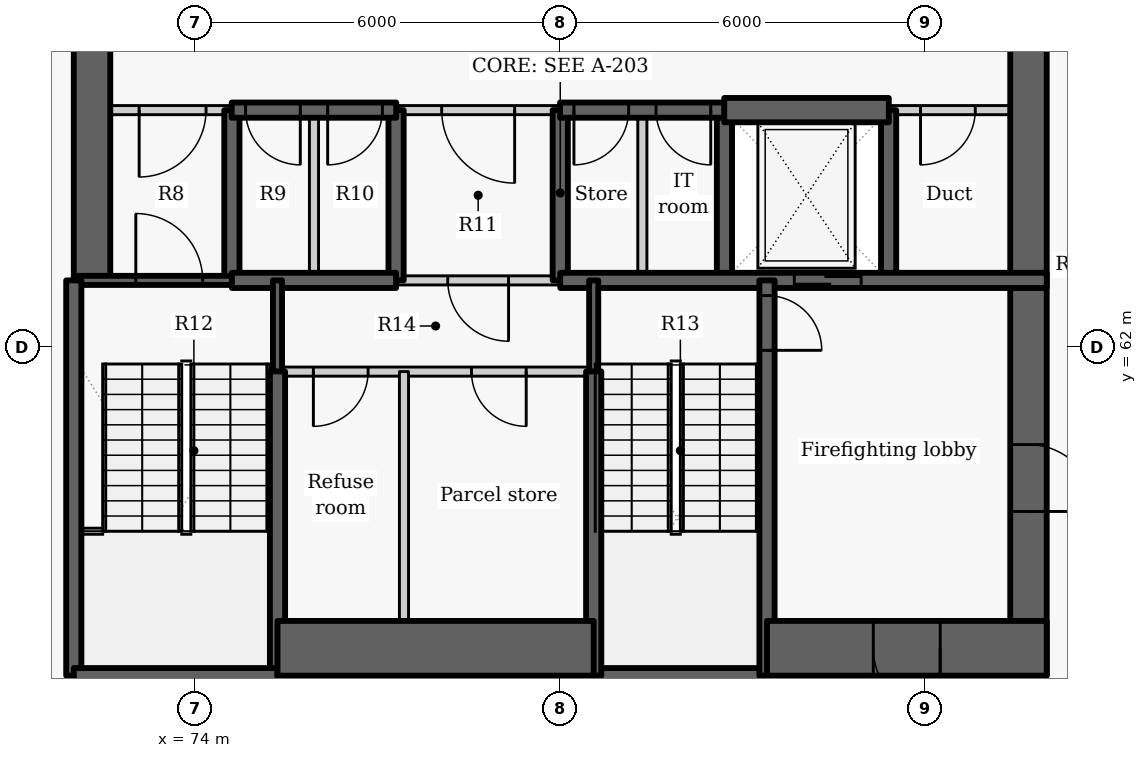
"""IFC4 building model, lengths in metres.
Left out: names, types, materials, properties, quantities, classifications, styles, units other than length and angle.
Written with IfcOpenShell. Run it as: python <this file> out.ifc"""

import sys

from ifc_helpers import new_model, si_unit, direction, frame, frame_2d, origin, place, context, subcontext, project, spatial, rectangle, extrude, element, fill, save


model = new_model("IFC4")
c1 = context("Model", 3, precision=1e-05, world=origin(), true_north=direction((0.0, 1.0)))
c2 = subcontext(c1, "Body", "Model", "MODEL_VIEW")
j1 = project(units=[si_unit("LENGTHUNIT", "METRE"), si_unit("PLANEANGLEUNIT", "RADIAN")], contexts=[c1])
p1 = place(None, origin())
s1 = spatial("IfcSite", under=j1, at=p1, CompositionType="ELEMENT")
p2 = place(p1, origin())
s2 = spatial("IfcBuilding", under=s1, at=p2, CompositionType="ELEMENT")
p3 = place(p2, frame((0.0, 0.0, 11.4)))
s3 = spatial("IfcBuildingStorey", under=s2, at=p3, CompositionType="ELEMENT", Elevation=11.4)
p4 = place(p3, frame((74.6, 63.1, -0.3), z_axis=(0.0, 0.0, 1.0), x_axis=(0.0, 1.0, 0.0)))
e1 = element("IfcWall", 1, at=p4, inside=s3, PredefinedType="SHEAR", context=c2, shape_type="SweptSolid", body=[
    extrude(rectangle(XDim=2.8, YDim=0.25, at=frame_2d((1.4, 0.0))), origin(), (0.0, 0.0, 1.0), 4.2),
])
p5 = place(p3, frame((72.3, 63.1, -0.3), z_axis=(0.0, 0.0, 1.0), x_axis=(0.0, 1.0, 0.0)))
e2 = element("IfcWall", 2, at=p5, inside=s3, PredefinedType="SHEAR", context=c2, shape_type="SweptSolid", body=[
    extrude(rectangle(XDim=9.1, YDim=0.6, at=frame_2d((4.55, 0.0))), origin(), (0.0, 0.0, 1.0), 4.2),
])
for number, where, z_axis, x_axis in (
    (3, (77.3, 63.1, -0.3), (0.0, 0.0, 1.0), (0.0, 1.0, 0.0)),
    (4, (80.0, 63.1, -0.3), (0.0, 0.0, 1.0), (0.0, 1.0, 0.0)),
    (5, (82.7, 63.1, -0.3), (0.0, 0.0, 1.0), (0.0, 1.0, 0.0)),
    (6, (85.4, 63.1, -0.3), (0.0, 0.0, 1.0), (0.0, 1.0, 0.0)),
):
    element("IfcWall", number, at=place(p3, frame(where, z_axis=z_axis, x_axis=x_axis)), inside=s3, PredefinedType="SHEAR", context=c2, shape_type="SweptSolid", body=[
        extrude(rectangle(XDim=2.8, YDim=0.25, at=frame_2d((1.4, 0.0))), origin(), (0.0, 0.0, 1.0), 4.2),
    ])
p6 = place(p3, frame((87.7, 72.2, -0.3), z_axis=(0.0, 0.0, 1.0), x_axis=(0.0, -1.0, 0.0)))
e7 = element("IfcWall", 7, at=p6, inside=s3, PredefinedType="SHEAR", context=c2, shape_type="SweptSolid", body=[
    extrude(rectangle(XDim=15.6, YDim=0.6, at=frame_2d((7.8, 0.0))), origin(), (0.0, 0.0, 1.0), 4.2),
])
p7 = place(p6, frame((11.8, 0.0, 0.3)))
e8 = element("IfcOpeningElement", 8, at=p7, cuts=e7, PredefinedType="OPENING", context=c2, shape_type="SweptSolid", body=[
    extrude(rectangle(XDim=1.1, YDim=2.1, at=frame_2d((0.55, 1.05))), frame((0.0, 0.31, 0.0), z_axis=(0.0, -1.0, 0.0), x_axis=(1.0, 0.0, 0.0)), (0.0, 0.0, 1.0), 0.62),
])
p8 = place(p3, frame((74.603, 65.9, 0.0), z_axis=(0.0, 0.0, 1.0), x_axis=(-1.0, 0.0, 0.0)))
e9 = element("IfcWall", 9, at=p8, inside=s3, PredefinedType="PARTITIONING", context=c2, shape_type="SweptSolid", body=[
    extrude(rectangle(XDim=2.603, YDim=0.15, at=frame_2d((1.302, 0.0))), origin(), (0.0, 0.0, 1.0), 3.9),
])
p9 = place(p8, frame((0.428, 0.0, 0.0)))
e10 = element("IfcOpeningElement", 10, at=p9, cuts=e9, PredefinedType="OPENING", context=c2, shape_type="SweptSolid", body=[
    extrude(rectangle(XDim=1.1, YDim=2.1, at=frame_2d((0.55, 1.05))), frame((0.0, 0.085, 0.0), z_axis=(0.0, -1.0, 0.0), x_axis=(1.0, 0.0, 0.0)), (0.0, 0.0, 1.0), 0.17),
])
p10 = place(p3, frame((80.003, 65.9, 0.0), z_axis=(0.0, 0.0, 1.0), x_axis=(-1.0, 0.0, 0.0)))
e11 = element("IfcWall", 11, at=p10, inside=s3, PredefinedType="PARTITIONING", context=c2, shape_type="SweptSolid", body=[
    extrude(rectangle(XDim=2.706, YDim=0.15, at=frame_2d((1.353, 0.0))), origin(), (0.0, 0.0, 1.0), 3.9),
])
p11 = place(p10, frame((0.753, 0.0, 0.0)))
e12 = element("IfcOpeningElement", 12, at=p11, cuts=e11, PredefinedType="OPENING", context=c2, shape_type="SweptSolid", body=[
    extrude(rectangle(XDim=1.2, YDim=2.1, at=frame_2d((0.6, 1.05))), frame((0.0, 0.085, 0.0), z_axis=(0.0, -1.0, 0.0), x_axis=(1.0, 0.0, 0.0)), (0.0, 0.0, 1.0), 0.17),
])
p12 = place(p3, frame((88.0, 65.9, 0.0), z_axis=(0.0, 0.0, 1.0), x_axis=(-1.0, 0.0, 0.0)))
e13 = element("IfcWall", 13, at=p12, inside=s3, PredefinedType="PARTITIONING", context=c2, shape_type="SweptSolid", body=[
    extrude(rectangle(XDim=2.603, YDim=0.15, at=frame_2d((1.302, 0.0))), origin(), (0.0, 0.0, 1.0), 3.9),
])
p13 = place(p12, frame((1.175, 0.0, 0.0)))
e14 = element("IfcOpeningElement", 14, at=p13, cuts=e13, PredefinedType="OPENING", context=c2, shape_type="SweptSolid", body=[
    extrude(rectangle(XDim=0.9, YDim=2.1, at=frame_2d((0.45, 1.05))), frame((0.0, 0.085, 0.0), z_axis=(0.0, -1.0, 0.0), x_axis=(1.0, 0.0, 0.0)), (0.0, 0.0, 1.0), 0.17),
])
p14 = place(p3, frame((77.303, 65.9, -0.3), z_axis=(0.0, 0.0, 1.0), x_axis=(-1.0, 0.0, 0.0)))
e15 = element("IfcWall", 15, at=p14, inside=s3, PredefinedType="SHEAR", context=c2, shape_type="SweptSolid", body=[
    extrude(rectangle(XDim=2.706, YDim=0.25, at=frame_2d((1.353, 0.0))), origin(), (0.0, 0.0, 1.0), 4.2),
])
p15 = place(p14, frame((1.578, 0.0, 0.3)))
e16 = element("IfcOpeningElement", 16, at=p15, cuts=e15, PredefinedType="OPENING", context=c2, shape_type="SweptSolid", body=[
    extrude(rectangle(XDim=0.9, YDim=2.1, at=frame_2d((0.45, 1.05))), frame((0.0, 0.135, 0.0), z_axis=(0.0, -1.0, 0.0), x_axis=(1.0, 0.0, 0.0)), (0.0, 0.0, 1.0), 0.27),
])
p16 = place(p14, frame((0.228, 0.0, 0.3)))
e17 = element("IfcOpeningElement", 17, at=p16, cuts=e15, PredefinedType="OPENING", context=c2, shape_type="SweptSolid", body=[
    extrude(rectangle(XDim=0.9, YDim=2.1, at=frame_2d((0.45, 1.05))), frame((0.0, 0.135, 0.0), z_axis=(0.0, -1.0, 0.0), x_axis=(1.0, 0.0, 0.0)), (0.0, 0.0, 1.0), 0.27),
])
p17 = place(p3, frame((82.703, 65.9, -0.3), z_axis=(0.0, 0.0, 1.0), x_axis=(-1.0, 0.0, 0.0)))
e18 = element("IfcWall", 18, at=p17, inside=s3, PredefinedType="SHEAR", context=c2, shape_type="SweptSolid", body=[
    extrude(rectangle(XDim=2.706, YDim=0.25, at=frame_2d((1.353, 0.0))), origin(), (0.0, 0.0, 1.0), 4.2),
])
p18 = place(p17, frame((1.578, 0.0, 0.3)))
e19 = element("IfcOpeningElement", 19, at=p18, cuts=e18, PredefinedType="OPENING", context=c2, shape_type="SweptSolid", body=[
    extrude(rectangle(XDim=0.9, YDim=2.1, at=frame_2d((0.45, 1.05))), frame((0.0, 0.135, 0.0), z_axis=(0.0, -1.0, 0.0), x_axis=(1.0, 0.0, 0.0)), (0.0, 0.0, 1.0), 0.27),
])
p19 = place(p17, frame((0.228, 0.0, 0.3)))
e20 = element("IfcOpeningElement", 20, at=p19, cuts=e18, PredefinedType="OPENING", context=c2, shape_type="SweptSolid", body=[
    extrude(rectangle(XDim=0.9, YDim=2.1, at=frame_2d((0.45, 1.05))), frame((0.0, 0.135, 0.0), z_axis=(0.0, -1.0, 0.0), x_axis=(1.0, 0.0, 0.0)), (0.0, 0.0, 1.0), 0.27),
])
p20 = place(p3, frame((82.697, 65.9, -0.3), z_axis=(0.0, 0.0, 1.0), x_axis=(1.0, 0.0, 0.0)))
e21 = element("IfcWall", 21, at=p20, inside=s3, PredefinedType="SHEAR", context=c2, shape_type="SweptSolid", body=[
    extrude(rectangle(XDim=2.706, YDim=0.4, at=frame_2d((1.353, 0.0))), origin(), (0.0, 0.0, 1.0), 4.2),
])
p21 = place(p3, frame((72.0, 63.1, -0.3), z_axis=(0.0, 0.0, 1.0), x_axis=(1.0, 0.0, 0.0)))
e22 = element("IfcWall", 22, at=p21, inside=s3, PredefinedType="SHEAR", context=c2, shape_type="SweptSolid", body=[
    extrude(rectangle(XDim=2.6, YDim=0.15, at=frame_2d((1.3, 0.0))), origin(), (0.0, 0.0, 1.0), 4.2),
])
p22 = place(p21, frame((1.02, 0.0, 0.3)))
e23 = element("IfcOpeningElement", 23, at=p22, cuts=e22, PredefinedType="OPENING", context=c2, shape_type="SweptSolid", body=[
    extrude(rectangle(XDim=1.1, YDim=2.1, at=frame_2d((0.55, 1.05))), frame((0.0, 0.085, 0.0), z_axis=(0.0, -1.0, 0.0), x_axis=(1.0, 0.0, 0.0)), (0.0, 0.0, 1.0), 0.17),
])
p23 = place(p3, frame((75.95, 63.1, 0.0), z_axis=(0.0, 0.0, 1.0), x_axis=(0.0, 1.0, 0.0)))
e24 = element("IfcWall", 24, at=p23, inside=s3, PredefinedType="PARTITIONING", context=c2, shape_type="SweptSolid", body=[
    extrude(rectangle(XDim=2.8, YDim=0.15, at=frame_2d((1.4, 0.0))), origin(), (0.0, 0.0, 1.0), 3.9),
])
p24 = place(p3, frame((74.6, 63.1, -0.3), z_axis=(0.0, 0.0, 1.0), x_axis=(1.0, 0.0, 0.0)))
e25 = element("IfcWall", 25, at=p24, inside=s3, PredefinedType="SHEAR", context=c2, shape_type="SweptSolid", body=[
    extrude(rectangle(XDim=2.7, YDim=0.25, at=frame_2d((1.35, 0.0))), origin(), (0.0, 0.0, 1.0), 4.2),
])
p25 = place(p3, frame((80.0, 63.1, -0.3), z_axis=(0.0, 0.0, 1.0), x_axis=(1.0, 0.0, 0.0)))
e26 = element("IfcWall", 26, at=p25, inside=s3, PredefinedType="SHEAR", context=c2, shape_type="SweptSolid", body=[
    extrude(rectangle(XDim=8.0, YDim=0.25, at=frame_2d((4.0, 0.0))), origin(), (0.0, 0.0, 1.0), 4.2),
])
p26 = place(p25, frame((3.849, 0.0, 0.3)))
e27 = element("IfcOpeningElement", 27, at=p26, cuts=e26, PredefinedType="OPENING", context=c2, shape_type="SweptSolid", body=[
    extrude(rectangle(XDim=1.1, YDim=2.1, at=frame_2d((0.55, 1.05))), frame((0.0, 0.135, 0.0), z_axis=(0.0, -1.0, 0.0), x_axis=(1.0, 0.0, 0.0)), (0.0, 0.0, 1.0), 0.27),
])
p27 = place(p3, frame((80.0, 63.1, 0.0), z_axis=(0.0, 0.0, 1.0), x_axis=(-1.0, 0.0, 0.0)))
e28 = element("IfcWall", 28, at=p27, inside=s3, PredefinedType="PARTITIONING", context=c2, shape_type="SweptSolid", body=[
    extrude(rectangle(XDim=2.7, YDim=0.15, at=frame_2d((1.35, 0.0))), origin(), (0.0, 0.0, 1.0), 3.9),
])
p28 = place(p27, frame((0.85, 0.0, 0.0)))
e29 = element("IfcOpeningElement", 29, at=p28, cuts=e28, PredefinedType="OPENING", context=c2, shape_type="SweptSolid", body=[
    extrude(rectangle(XDim=1.0, YDim=2.1, at=frame_2d((0.5, 1.05))), frame((0.0, 0.085, 0.0), z_axis=(0.0, -1.0, 0.0), x_axis=(1.0, 0.0, 0.0)), (0.0, 0.0, 1.0), 0.17),
])
p29 = place(p3, frame((81.35, 63.1, 0.0), z_axis=(0.0, 0.0, 1.0), x_axis=(0.0, 1.0, 0.0)))
e30 = element("IfcWall", 30, at=p29, inside=s3, PredefinedType="PARTITIONING", context=c2, shape_type="SweptSolid", body=[
    extrude(rectangle(XDim=2.8, YDim=0.15, at=frame_2d((1.4, 0.0))), origin(), (0.0, 0.0, 1.0), 3.9),
])
p30 = place(p3, frame((75.35, 61.597, -0.3), z_axis=(0.0, 0.0, 1.0), x_axis=(0.0, 1.0, 0.0)))
e31 = element("IfcWall", 31, at=p30, inside=s3, PredefinedType="SHEAR", context=c2, shape_type="SweptSolid", body=[
    extrude(rectangle(XDim=1.503, YDim=0.15, at=frame_2d((0.751, 0.0))), origin(), (0.0, 0.0, 1.0), 4.2),
])
p31 = place(p3, frame((75.35, 56.6, -0.3), z_axis=(0.0, 0.0, 1.0), x_axis=(0.0, 1.0, 0.0)))
e32 = element("IfcWall", 32, at=p31, inside=s3, PredefinedType="SHEAR", context=c2, shape_type="SweptSolid", body=[
    extrude(rectangle(XDim=5.003, YDim=0.25, at=frame_2d((2.501, 0.0))), origin(), (0.0, 0.0, 1.0), 4.2),
])
p32 = place(p3, frame((72.0, 56.6, -0.3), z_axis=(0.0, 0.0, 1.0), x_axis=(0.0, 1.0, 0.0)))
e33 = element("IfcWall", 33, at=p32, inside=s3, PredefinedType="SHEAR", context=c2, shape_type="SweptSolid", body=[
    extrude(rectangle(XDim=6.5, YDim=0.25, at=frame_2d((3.25, 0.0))), origin(), (0.0, 0.0, 1.0), 4.2),
])
p33 = place(p3, frame((72.0, 56.6, -0.3), z_axis=(0.0, 0.0, 1.0), x_axis=(1.0, 0.0, 0.0)))
e34 = element("IfcWall", 34, at=p33, inside=s3, PredefinedType="SHEAR", context=c2, shape_type="SweptSolid", body=[
    extrude(rectangle(XDim=3.35, YDim=0.25, at=frame_2d((1.675, 0.0))), origin(), (0.0, 0.0, 1.0), 4.2),
])
p34 = place(p3, frame((80.55, 56.6, -0.3), z_axis=(0.0, 0.0, 1.0), x_axis=(1.0, 0.0, 0.0)))
e35 = element("IfcWall", 35, at=p34, inside=s3, PredefinedType="SHEAR", context=c2, shape_type="SweptSolid", body=[
    extrude(rectangle(XDim=2.85, YDim=0.25, at=frame_2d((1.425, 0.0))), origin(), (0.0, 0.0, 1.0), 4.2),
])
p35 = place(p3, frame((83.4, 63.1, -0.3), z_axis=(0.0, 0.0, 1.0), x_axis=(0.0, -1.0, 0.0)))
e36 = element("IfcWall", 36, at=p35, inside=s3, PredefinedType="SHEAR", context=c2, shape_type="SweptSolid", body=[
    extrude(rectangle(XDim=6.5, YDim=0.25, at=frame_2d((3.25, 0.0))), origin(), (0.0, 0.0, 1.0), 4.2),
])
p36 = place(p35, frame((0.25, 0.0, 0.3)))
e37 = element("IfcOpeningElement", 37, at=p36, cuts=e36, PredefinedType="OPENING", context=c2, shape_type="SweptSolid", body=[
    extrude(rectangle(XDim=0.9, YDim=2.1, at=frame_2d((0.45, 1.05))), frame((0.0, 0.135, 0.0), z_axis=(0.0, -1.0, 0.0), x_axis=(1.0, 0.0, 0.0)), (0.0, 0.0, 1.0), 0.27),
])
p37 = place(p3, frame((80.55, 61.597, -0.3), z_axis=(0.0, 0.0, 1.0), x_axis=(0.0, 1.0, 0.0)))
e38 = element("IfcWall", 38, at=p37, inside=s3, PredefinedType="SHEAR", context=c2, shape_type="SweptSolid", body=[
    extrude(rectangle(XDim=1.503, YDim=0.15, at=frame_2d((0.751, 0.0))), origin(), (0.0, 0.0, 1.0), 4.2),
])
p38 = place(p3, frame((80.55, 56.6, -0.3), z_axis=(0.0, 0.0, 1.0), x_axis=(0.0, 1.0, 0.0)))
e39 = element("IfcWall", 39, at=p38, inside=s3, PredefinedType="SHEAR", context=c2, shape_type="SweptSolid", body=[
    extrude(rectangle(XDim=5.003, YDim=0.25, at=frame_2d((2.501, 0.0))), origin(), (0.0, 0.0, 1.0), 4.2),
])
p39 = place(p3, frame((75.35, 57.05, -0.3), z_axis=(0.0, 0.0, 1.0), x_axis=(1.0, 0.0, 0.0)))
e40 = element("IfcWall", 40, at=p39, inside=s3, PredefinedType="SHEAR", context=c2, shape_type="SweptSolid", body=[
    extrude(rectangle(XDim=5.2, YDim=0.9, at=frame_2d((2.6, 0.0))), origin(), (0.0, 0.0, 1.0), 4.2),
])
p40 = place(p3, frame((88.0, 57.05, -0.3), z_axis=(0.0, 0.0, 1.0), x_axis=(-1.0, 0.0, 0.0)))
e41 = element("IfcWall", 41, at=p40, inside=s3, PredefinedType="SHEAR", context=c2, shape_type="SweptSolid", body=[
    extrude(rectangle(XDim=4.6, YDim=0.9, at=frame_2d((2.3, 0.0))), origin(), (0.0, 0.0, 1.0), 4.2),
])
p41 = place(p40, frame((1.752, 0.0, 0.3)))
e42 = element("IfcOpeningElement", 42, at=p41, cuts=e41, PredefinedType="OPENING", context=c2, shape_type="SweptSolid", body=[
    extrude(rectangle(XDim=1.1, YDim=2.1, at=frame_2d((0.55, 1.05))), frame((0.0, 0.46, 0.0), z_axis=(0.0, -1.0, 0.0), x_axis=(1.0, 0.0, 0.0)), (0.0, 0.0, 1.0), 0.92),
])
p42 = place(p3, frame((80.55, 61.6, 0.0), z_axis=(0.0, 0.0, 1.0), x_axis=(-1.0, 0.0, 0.0)))
e43 = element("IfcWall", 43, at=p42, inside=s3, PredefinedType="PARTITIONING", context=c2, shape_type="SweptSolid", body=[
    extrude(rectangle(XDim=5.2, YDim=0.15, at=frame_2d((2.6, 0.0))), origin(), (0.0, 0.0, 1.0), 3.9),
])
p43 = place(p42, frame((3.71, 0.0, 0.0)))
e44 = element("IfcOpeningElement", 44, at=p43, cuts=e43, PredefinedType="OPENING", context=c2, shape_type="SweptSolid", body=[
    extrude(rectangle(XDim=0.9, YDim=2.1, at=frame_2d((0.45, 1.05))), frame((0.0, 0.085, 0.0), z_axis=(0.0, -1.0, 0.0), x_axis=(1.0, 0.0, 0.0)), (0.0, 0.0, 1.0), 0.17),
])
p44 = place(p42, frame((1.11, 0.0, 0.0)))
e45 = element("IfcOpeningElement", 45, at=p44, cuts=e43, PredefinedType="OPENING", context=c2, shape_type="SweptSolid", body=[
    extrude(rectangle(XDim=0.9, YDim=2.1, at=frame_2d((0.45, 1.05))), frame((0.0, 0.085, 0.0), z_axis=(0.0, -1.0, 0.0), x_axis=(1.0, 0.0, 0.0)), (0.0, 0.0, 1.0), 0.17),
])
p45 = place(p3, frame((77.43, 56.6, 0.0), z_axis=(0.0, 0.0, 1.0), x_axis=(0.0, 1.0, 0.0)))
e46 = element("IfcWall", 46, at=p45, inside=s3, PredefinedType="PARTITIONING", context=c2, shape_type="SweptSolid", body=[
    extrude(rectangle(XDim=5.0, YDim=0.15, at=frame_2d((2.5, 0.0))), origin(), (0.0, 0.0, 1.0), 3.9),
])
p46 = place(p9, origin())
e47 = element("IfcDoor", 47, at=p46, inside=s3, OperationType="SINGLE_SWING_RIGHT", PredefinedType="DOOR", context=c2, shape_type="SweptSolid", body=[
    extrude(rectangle(XDim=1.1, YDim=2.1, at=frame_2d((0.55, 1.05))), frame((0.0, 0.025, 0.0), z_axis=(0.0, -1.0, 0.0), x_axis=(1.0, 0.0, 0.0)), (0.0, 0.0, 1.0), 0.05),
])
fill(e10, e47)
p47 = place(p15, origin())
e48 = element("IfcDoor", 48, at=p47, inside=s3, OperationType="SINGLE_SWING_LEFT", PredefinedType="DOOR", context=c2, shape_type="SweptSolid", body=[
    extrude(rectangle(XDim=0.9, YDim=2.1, at=frame_2d((0.45, 1.05))), frame((0.0, 0.025, 0.0), z_axis=(0.0, -1.0, 0.0), x_axis=(1.0, 0.0, 0.0)), (0.0, 0.0, 1.0), 0.05),
])
fill(e16, e48)
p48 = place(p16, origin())
e49 = element("IfcDoor", 49, at=p48, inside=s3, OperationType="SINGLE_SWING_RIGHT", PredefinedType="DOOR", context=c2, shape_type="SweptSolid", body=[
    extrude(rectangle(XDim=0.9, YDim=2.1, at=frame_2d((0.45, 1.05))), frame((0.0, 0.025, 0.0), z_axis=(0.0, -1.0, 0.0), x_axis=(1.0, 0.0, 0.0)), (0.0, 0.0, 1.0), 0.05),
])
fill(e17, e49)
p49 = place(p11, origin())
e50 = element("IfcDoor", 50, at=p49, inside=s3, OperationType="DOUBLE_DOOR_SINGLE_SWING", PredefinedType="DOOR", context=c2, shape_type="SweptSolid", body=[
    extrude(rectangle(XDim=1.2, YDim=2.1, at=frame_2d((0.6, 1.05))), frame((0.0, 0.025, 0.0), z_axis=(0.0, -1.0, 0.0), x_axis=(1.0, 0.0, 0.0)), (0.0, 0.0, 1.0), 0.05),
])
fill(e12, e50)
p50 = place(p18, origin())
e51 = element("IfcDoor", 51, at=p50, inside=s3, OperationType="SINGLE_SWING_RIGHT", PredefinedType="DOOR", context=c2, shape_type="SweptSolid", body=[
    extrude(rectangle(XDim=0.9, YDim=2.1, at=frame_2d((0.45, 1.05))), frame((0.0, 0.025, 0.0), z_axis=(0.0, -1.0, 0.0), x_axis=(1.0, 0.0, 0.0)), (0.0, 0.0, 1.0), 0.05),
])
fill(e19, e51)
p51 = place(p19, origin())
e52 = element("IfcDoor", 52, at=p51, inside=s3, OperationType="SINGLE_SWING_LEFT", PredefinedType="DOOR", context=c2, shape_type="SweptSolid", body=[
    extrude(rectangle(XDim=0.9, YDim=2.1, at=frame_2d((0.45, 1.05))), frame((0.0, 0.025, 0.0), z_axis=(0.0, -1.0, 0.0), x_axis=(1.0, 0.0, 0.0)), (0.0, 0.0, 1.0), 0.05),
])
fill(e20, e52)
p52 = place(p26, origin())
e53 = element("IfcDoor", 53, at=p52, inside=s3, OperationType="SLIDING_TO_LEFT", PredefinedType="DOOR", context=c2, shape_type="SweptSolid", body=[
    extrude(rectangle(XDim=1.1, YDim=2.1, at=frame_2d((0.55, 1.05))), frame((0.0, 0.025, 0.0), z_axis=(0.0, -1.0, 0.0), x_axis=(1.0, 0.0, 0.0)), (0.0, 0.0, 1.0), 0.05),
])
fill(e27, e53)
p53 = place(p13, origin())
e54 = element("IfcDoor", 54, at=p53, inside=s3, OperationType="SINGLE_SWING_RIGHT", PredefinedType="DOOR", context=c2, shape_type="SweptSolid", body=[
    extrude(rectangle(XDim=0.9, YDim=2.1, at=frame_2d((0.45, 1.05))), frame((0.0, 0.025, 0.0), z_axis=(0.0, -1.0, 0.0), x_axis=(1.0, 0.0, 0.0)), (0.0, 0.0, 1.0), 0.05),
])
fill(e14, e54)
p54 = place(p28, origin())
e55 = element("IfcDoor", 55, at=p54, inside=s3, OperationType="SINGLE_SWING_LEFT", PredefinedType="DOOR", context=c2, shape_type="SweptSolid", body=[
    extrude(rectangle(XDim=1.0, YDim=2.1, at=frame_2d((0.5, 1.05))), frame((0.0, 0.025, 0.0), z_axis=(0.0, -1.0, 0.0), x_axis=(1.0, 0.0, 0.0)), (0.0, 0.0, 1.0), 0.05),
])
fill(e29, e55)
p55 = place(p43, origin())
e56 = element("IfcDoor", 56, at=p55, inside=s3, OperationType="SINGLE_SWING_RIGHT", PredefinedType="DOOR", context=c2, shape_type="SweptSolid", body=[
    extrude(rectangle(XDim=0.9, YDim=2.1, at=frame_2d((0.45, 1.05))), frame((0.0, 0.025, 0.0), z_axis=(0.0, -1.0, 0.0), x_axis=(1.0, 0.0, 0.0)), (0.0, 0.0, 1.0), 0.05),
])
fill(e44, e56)
p56 = place(p44, origin())
e57 = element("IfcDoor", 57, at=p56, inside=s3, OperationType="SINGLE_SWING_LEFT", PredefinedType="DOOR", context=c2, shape_type="SweptSolid", body=[
    extrude(rectangle(XDim=0.9, YDim=2.1, at=frame_2d((0.45, 1.05))), frame((0.0, 0.025, 0.0), z_axis=(0.0, -1.0, 0.0), x_axis=(1.0, 0.0, 0.0)), (0.0, 0.0, 1.0), 0.05),
])
fill(e45, e57)
p57 = place(p22, origin())
e58 = element("IfcDoor", 58, at=p57, inside=s3, OperationType="SINGLE_SWING_LEFT", PredefinedType="DOOR", context=c2, shape_type="SweptSolid", body=[
    extrude(rectangle(XDim=1.1, YDim=2.1, at=frame_2d((0.55, 1.05))), frame((0.0, 0.025, 0.0), z_axis=(0.0, -1.0, 0.0), x_axis=(1.0, 0.0, 0.0)), (0.0, 0.0, 1.0), 0.05),
])
fill(e23, e58)
p58 = place(p36, origin())
e59 = element("IfcDoor", 59, at=p58, inside=s3, OperationType="SINGLE_SWING_RIGHT", PredefinedType="DOOR", context=c2, shape_type="SweptSolid", body=[
    extrude(rectangle(XDim=0.9, YDim=2.1, at=frame_2d((0.45, 1.05))), frame((0.0, 0.025, 0.0), z_axis=(0.0, -1.0, 0.0), x_axis=(1.0, 0.0, 0.0)), (0.0, 0.0, 1.0), 0.05),
])
fill(e37, e59)
p59 = place(p7, origin())
e60 = element("IfcDoor", 60, at=p59, inside=s3, OperationType="SINGLE_SWING_RIGHT", PredefinedType="DOOR", context=c2, shape_type="SweptSolid", body=[
    extrude(rectangle(XDim=1.1, YDim=2.1, at=frame_2d((0.55, 1.05))), frame((0.0, 0.025, 0.0), z_axis=(0.0, -1.0, 0.0), x_axis=(1.0, 0.0, 0.0)), (0.0, 0.0, 1.0), 0.05),
])
fill(e8, e60)
p60 = place(p41, origin())
e61 = element("IfcDoor", 61, at=p60, inside=s3, OperationType="SINGLE_SWING_LEFT", PredefinedType="DOOR", context=c2, shape_type="SweptSolid", body=[
    extrude(rectangle(XDim=1.1, YDim=2.1, at=frame_2d((0.55, 1.05))), frame((0.0, 0.025, 0.0), z_axis=(0.0, -1.0, 0.0), x_axis=(1.0, 0.0, 0.0)), (0.0, 0.0, 1.0), 0.05),
])
fill(e42, e61)
save(model, sys.argv[1])
